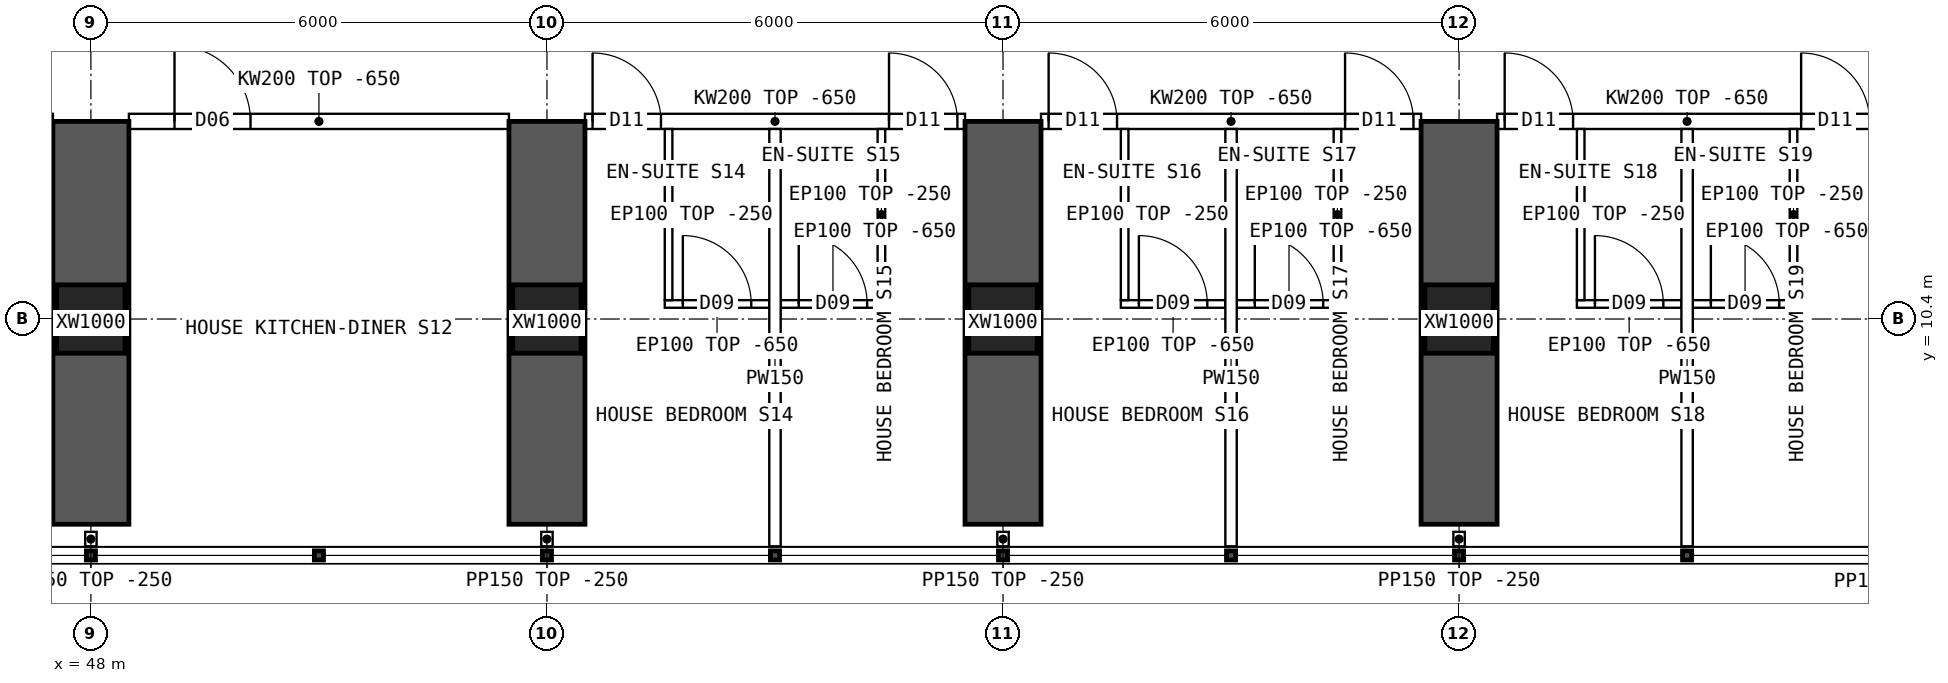
"""IFC4 building model, lengths in metres.
Left out: names, types, materials, properties, quantities, classifications, styles, units other than length and angle.
Written with IfcOpenShell. Run it as: python <this file> out.ifc"""

import sys

from ifc_helpers import new_model, si_unit, direction, frame, frame_2d, origin, origin_2d, place, context, subcontext, project, spatial, polyline, rectangle, hollow_rectangle, outline, extrude, element, fill, save


model = new_model("IFC4")
c1 = context("Model", 3, precision=1e-05, world=origin(), true_north=direction((0.0, 1.0)))
c2 = subcontext(c1, "Body", "Model", "MODEL_VIEW")
j1 = project(units=[si_unit("LENGTHUNIT", "METRE"), si_unit("PLANEANGLEUNIT", "RADIAN")], contexts=[c1])
p1 = place(None, origin())
s1 = spatial("IfcSite", under=j1, at=p1, CompositionType="ELEMENT")
p2 = place(p1, origin())
s2 = spatial("IfcBuilding", under=s1, at=p2, CompositionType="ELEMENT")
p3 = place(p2, frame((0.0, 0.0, 31.45)))
s3 = spatial("IfcBuildingStorey", under=s2, at=p3, CompositionType="ELEMENT", Elevation=31.45)
for number, where, z_axis, x_axis in (
    (1, (48.0, 10.4, 0.0), (0.0, 0.0, 1.0), (1.0, 0.0, 0.0)),
    (2, (54.0, 10.4, 0.0), (0.0, 0.0, 1.0), (1.0, 0.0, 0.0)),
    (3, (60.0, 10.4, 0.0), (0.0, 0.0, 1.0), (1.0, 0.0, 0.0)),
    (4, (66.0, 10.4, 0.0), (0.0, 0.0, 1.0), (1.0, 0.0, 0.0)),
):
    element("IfcColumn", number, at=place(p3, frame(where, z_axis=z_axis, x_axis=x_axis)), inside=s3, PredefinedType="COLUMN", context=c2, shape_type="SweptSolid", body=[
        extrude(hollow_rectangle(XDim=0.9, YDim=0.9, WallThickness=0.09, at=origin_2d()), origin(), (0.0, 0.0, 1.0), 3.75),
    ])
for number, where, z_axis, x_axis in (
    (5, (48.0, 7.7, 0.0), (0.0, 0.0, 1.0), (0.0, 1.0, 0.0)),
    (6, (54.0, 7.7, 0.0), (0.0, 0.0, 1.0), (0.0, 1.0, 0.0)),
    (7, (60.0, 7.7, 0.0), (0.0, 0.0, 1.0), (0.0, 1.0, 0.0)),
    (8, (66.0, 7.7, 0.0), (0.0, 0.0, 1.0), (0.0, 1.0, 0.0)),
):
    element("IfcWall", number, at=place(p3, frame(where, z_axis=z_axis, x_axis=x_axis)), inside=s3, PredefinedType="SHEAR", context=c2, shape_type="SweptSolid", body=[
        extrude(rectangle(XDim=5.3, YDim=1.0, at=frame_2d((2.65, 0.0))), origin(), (0.0, 0.0, 1.0), 3.75),
    ])
p4 = place(p3, frame((48.5, 13.0, 0.0), z_axis=(0.0, 0.0, 1.0), x_axis=(1.0, 0.0, 0.0)))
e9 = element("IfcWall", 9, at=p4, inside=s3, PredefinedType="SOLIDWALL", context=c2, shape_type="SweptSolid", body=[
    extrude(outline(polyline([(0.0, 0.0), (5.0, 0.0), (5.0, 3.1), (0.0, 3.1), (0.0, 0.0)])), frame((0.0, 0.1, 0.0), z_axis=(0.0, -1.0, 0.0), x_axis=(1.0, 0.0, 0.0)), (0.0, 0.0, 1.0), 0.2),
])
p5 = place(p4, frame((0.6, 0.0, 0.0)))
e10 = element("IfcOpeningElement", 10, at=p5, cuts=e9, PredefinedType="OPENING", context=c2, shape_type="SweptSolid", body=[
    extrude(rectangle(XDim=1.0, YDim=2.1, at=frame_2d((0.5, 1.05))), frame((0.0, 0.11, 0.0), z_axis=(0.0, -1.0, 0.0), x_axis=(1.0, 0.0, 0.0)), (0.0, 0.0, 1.0), 0.22),
])
p6 = place(p3, frame((54.5, 13.0, 0.0), z_axis=(0.0, 0.0, 1.0), x_axis=(1.0, 0.0, 0.0)))
e11 = element("IfcWall", 11, at=p6, inside=s3, PredefinedType="SOLIDWALL", context=c2, shape_type="SweptSolid", body=[
    extrude(outline(polyline([(0.0, 0.0), (5.0, 0.0), (5.0, 3.1), (0.0, 3.1), (0.0, 0.0)])), frame((0.0, 0.1, 0.0), z_axis=(0.0, -1.0, 0.0), x_axis=(1.0, 0.0, 0.0)), (0.0, 0.0, 1.0), 0.2),
])
p7 = place(p6, frame((0.1, 0.0, 0.0)))
e12 = element("IfcOpeningElement", 12, at=p7, cuts=e11, PredefinedType="OPENING", context=c2, shape_type="SweptSolid", body=[
    extrude(rectangle(XDim=0.9, YDim=2.1, at=frame_2d((0.45, 1.05))), frame((0.0, 0.11, 0.0), z_axis=(0.0, -1.0, 0.0), x_axis=(1.0, 0.0, 0.0)), (0.0, 0.0, 1.0), 0.22),
])
p8 = place(p6, frame((4.0, 0.0, 0.0)))
e13 = element("IfcOpeningElement", 13, at=p8, cuts=e11, PredefinedType="OPENING", context=c2, shape_type="SweptSolid", body=[
    extrude(rectangle(XDim=0.9, YDim=2.1, at=frame_2d((0.45, 1.05))), frame((0.0, 0.11, 0.0), z_axis=(0.0, -1.0, 0.0), x_axis=(1.0, 0.0, 0.0)), (0.0, 0.0, 1.0), 0.22),
])
p9 = place(p3, frame((60.5, 13.0, 0.0), z_axis=(0.0, 0.0, 1.0), x_axis=(1.0, 0.0, 0.0)))
e14 = element("IfcWall", 14, at=p9, inside=s3, PredefinedType="SOLIDWALL", context=c2, shape_type="SweptSolid", body=[
    extrude(outline(polyline([(0.0, 0.0), (5.0, 0.0), (5.0, 3.1), (0.0, 3.1), (0.0, 0.0)])), frame((0.0, 0.1, 0.0), z_axis=(0.0, -1.0, 0.0), x_axis=(1.0, 0.0, 0.0)), (0.0, 0.0, 1.0), 0.2),
])
p10 = place(p9, frame((0.1, 0.0, 0.0)))
e15 = element("IfcOpeningElement", 15, at=p10, cuts=e14, PredefinedType="OPENING", context=c2, shape_type="SweptSolid", body=[
    extrude(rectangle(XDim=0.9, YDim=2.1, at=frame_2d((0.45, 1.05))), frame((0.0, 0.11, 0.0), z_axis=(0.0, -1.0, 0.0), x_axis=(1.0, 0.0, 0.0)), (0.0, 0.0, 1.0), 0.22),
])
p11 = place(p9, frame((4.0, 0.0, 0.0)))
e16 = element("IfcOpeningElement", 16, at=p11, cuts=e14, PredefinedType="OPENING", context=c2, shape_type="SweptSolid", body=[
    extrude(rectangle(XDim=0.9, YDim=2.1, at=frame_2d((0.45, 1.05))), frame((0.0, 0.11, 0.0), z_axis=(0.0, -1.0, 0.0), x_axis=(1.0, 0.0, 0.0)), (0.0, 0.0, 1.0), 0.22),
])
p12 = place(p3, frame((66.5, 13.0, 0.0), z_axis=(0.0, 0.0, 1.0), x_axis=(1.0, 0.0, 0.0)))
e17 = element("IfcWall", 17, at=p12, inside=s3, PredefinedType="SOLIDWALL", context=c2, shape_type="SweptSolid", body=[
    extrude(outline(polyline([(0.0, 0.0), (5.0, 0.0), (5.0, 3.1), (0.0, 3.1), (0.0, 0.0)])), frame((0.0, 0.1, 0.0), z_axis=(0.0, -1.0, 0.0), x_axis=(1.0, 0.0, 0.0)), (0.0, 0.0, 1.0), 0.2),
])
p13 = place(p12, frame((0.1, 0.0, 0.0)))
e18 = element("IfcOpeningElement", 18, at=p13, cuts=e17, PredefinedType="OPENING", context=c2, shape_type="SweptSolid", body=[
    extrude(rectangle(XDim=0.9, YDim=2.1, at=frame_2d((0.45, 1.05))), frame((0.0, 0.11, 0.0), z_axis=(0.0, -1.0, 0.0), x_axis=(1.0, 0.0, 0.0)), (0.0, 0.0, 1.0), 0.22),
])
p14 = place(p12, frame((4.0, 0.0, 0.0)))
e19 = element("IfcOpeningElement", 19, at=p14, cuts=e17, PredefinedType="OPENING", context=c2, shape_type="SweptSolid", body=[
    extrude(rectangle(XDim=0.9, YDim=2.1, at=frame_2d((0.45, 1.05))), frame((0.0, 0.11, 0.0), z_axis=(0.0, -1.0, 0.0), x_axis=(1.0, 0.0, 0.0)), (0.0, 0.0, 1.0), 0.22),
])
p15 = place(p3, frame((57.0, 7.41, 0.0), z_axis=(0.0, 0.0, 1.0), x_axis=(0.0, 1.0, 0.0)))
e20 = element("IfcWall", 20, at=p15, inside=s3, PredefinedType="PARTITIONING", context=c2, shape_type="SweptSolid", body=[
    extrude(outline(polyline([(0.0, 0.0), (5.49, 0.0), (5.49, 3.1), (5.442, 3.1), (5.44, 3.5), (3.192, 3.5), (3.19, 3.1), (2.792, 3.1), (2.79, 3.5), (0.0, 3.5), (0.0, 0.0)])), frame((0.0, 0.075, 0.0), z_axis=(0.0, -1.0, 0.0), x_axis=(1.0, 0.0, 0.0)), (0.0, 0.0, 1.0), 0.15),
])
p16 = place(p3, frame((56.925, 10.598, 0.0), z_axis=(0.0, 0.0, 1.0), x_axis=(-1.0, 0.0, 0.0)))
e21 = element("IfcWall", 21, at=p16, inside=s3, PredefinedType="PARTITIONING", context=c2, shape_type="SweptSolid", body=[
    extrude(outline(polyline([(0.0, 0.0), (1.375, 0.0), (1.375, 3.1), (0.0, 3.1), (0.0, 0.0)])), frame((0.0, 0.05, 0.0), z_axis=(0.0, -1.0, 0.0), x_axis=(1.0, 0.0, 0.0)), (0.0, 0.0, 1.0), 0.1),
])
p17 = place(p16, frame((0.238, 0.0, 0.0)))
e22 = element("IfcOpeningElement", 22, at=p17, cuts=e21, PredefinedType="OPENING", context=c2, shape_type="SweptSolid", body=[
    extrude(rectangle(XDim=0.9, YDim=2.1, at=frame_2d((0.45, 1.05))), frame((0.0, 0.06, 0.0), z_axis=(0.0, -1.0, 0.0), x_axis=(1.0, 0.0, 0.0)), (0.0, 0.0, 1.0), 0.12),
])
p18 = place(p3, frame((55.6, 10.648, 0.0), z_axis=(0.0, 0.0, 1.0), x_axis=(0.0, 1.0, 0.0)))
e23 = element("IfcWall", 23, at=p18, inside=s3, PredefinedType="PARTITIONING", context=c2, shape_type="SweptSolid", body=[
    extrude(outline(polyline([(0.0, 0.0), (2.252, 0.0), (2.252, 3.1), (2.204, 3.1), (2.202, 3.5), (0.0, 3.5), (0.0, 0.0)])), frame((0.0, 0.05, 0.0), z_axis=(0.0, -1.0, 0.0), x_axis=(1.0, 0.0, 0.0)), (0.0, 0.0, 1.0), 0.1),
])
p19 = place(p3, frame((58.45, 10.598, 0.0), z_axis=(0.0, 0.0, 1.0), x_axis=(-1.0, 0.0, 0.0)))
e24 = element("IfcWall", 24, at=p19, inside=s3, PredefinedType="PARTITIONING", context=c2, shape_type="SweptSolid", body=[
    extrude(outline(polyline([(0.0, 0.0), (1.375, 0.0), (1.375, 3.1), (0.0, 3.1), (0.0, 0.0)])), frame((0.0, 0.05, 0.0), z_axis=(0.0, -1.0, 0.0), x_axis=(1.0, 0.0, 0.0)), (0.0, 0.0, 1.0), 0.1),
])
p20 = place(p19, frame((0.238, 0.0, 0.0)))
e25 = element("IfcOpeningElement", 25, at=p20, cuts=e24, PredefinedType="OPENING", context=c2, shape_type="SweptSolid", body=[
    extrude(rectangle(XDim=0.9, YDim=2.1, at=frame_2d((0.45, 1.05))), frame((0.0, 0.06, 0.0), z_axis=(0.0, -1.0, 0.0), x_axis=(1.0, 0.0, 0.0)), (0.0, 0.0, 1.0), 0.12),
])
p21 = place(p3, frame((58.4, 10.648, 0.0), z_axis=(0.0, 0.0, 1.0), x_axis=(0.0, 1.0, 0.0)))
e26 = element("IfcWall", 26, at=p21, inside=s3, PredefinedType="PARTITIONING", context=c2, shape_type="SweptSolid", body=[
    extrude(outline(polyline([(0.0, 0.0), (2.252, 0.0), (2.252, 3.1), (2.204, 3.1), (2.202, 3.5), (0.0, 3.5), (0.0, 0.0)])), frame((0.0, 0.05, 0.0), z_axis=(0.0, -1.0, 0.0), x_axis=(1.0, 0.0, 0.0)), (0.0, 0.0, 1.0), 0.1),
])
p22 = place(p3, frame((63.0, 7.41, 0.0), z_axis=(0.0, 0.0, 1.0), x_axis=(0.0, 1.0, 0.0)))
e27 = element("IfcWall", 27, at=p22, inside=s3, PredefinedType="PARTITIONING", context=c2, shape_type="SweptSolid", body=[
    extrude(outline(polyline([(0.0, 0.0), (5.49, 0.0), (5.49, 3.1), (5.442, 3.1), (5.44, 3.5), (3.192, 3.5), (3.19, 3.1), (2.792, 3.1), (2.79, 3.5), (0.0, 3.5), (0.0, 0.0)])), frame((0.0, 0.075, 0.0), z_axis=(0.0, -1.0, 0.0), x_axis=(1.0, 0.0, 0.0)), (0.0, 0.0, 1.0), 0.15),
])
p23 = place(p3, frame((62.925, 10.598, 0.0), z_axis=(0.0, 0.0, 1.0), x_axis=(-1.0, 0.0, 0.0)))
e28 = element("IfcWall", 28, at=p23, inside=s3, PredefinedType="PARTITIONING", context=c2, shape_type="SweptSolid", body=[
    extrude(outline(polyline([(0.0, 0.0), (1.375, 0.0), (1.375, 3.1), (0.0, 3.1), (0.0, 0.0)])), frame((0.0, 0.05, 0.0), z_axis=(0.0, -1.0, 0.0), x_axis=(1.0, 0.0, 0.0)), (0.0, 0.0, 1.0), 0.1),
])
p24 = place(p23, frame((0.238, 0.0, 0.0)))
e29 = element("IfcOpeningElement", 29, at=p24, cuts=e28, PredefinedType="OPENING", context=c2, shape_type="SweptSolid", body=[
    extrude(rectangle(XDim=0.9, YDim=2.1, at=frame_2d((0.45, 1.05))), frame((0.0, 0.06, 0.0), z_axis=(0.0, -1.0, 0.0), x_axis=(1.0, 0.0, 0.0)), (0.0, 0.0, 1.0), 0.12),
])
p25 = place(p3, frame((61.6, 10.648, 0.0), z_axis=(0.0, 0.0, 1.0), x_axis=(0.0, 1.0, 0.0)))
e30 = element("IfcWall", 30, at=p25, inside=s3, PredefinedType="PARTITIONING", context=c2, shape_type="SweptSolid", body=[
    extrude(outline(polyline([(0.0, 0.0), (2.252, 0.0), (2.252, 3.1), (2.204, 3.1), (2.202, 3.5), (0.0, 3.5), (0.0, 0.0)])), frame((0.0, 0.05, 0.0), z_axis=(0.0, -1.0, 0.0), x_axis=(1.0, 0.0, 0.0)), (0.0, 0.0, 1.0), 0.1),
])
p26 = place(p3, frame((64.45, 10.598, 0.0), z_axis=(0.0, 0.0, 1.0), x_axis=(-1.0, 0.0, 0.0)))
e31 = element("IfcWall", 31, at=p26, inside=s3, PredefinedType="PARTITIONING", context=c2, shape_type="SweptSolid", body=[
    extrude(outline(polyline([(0.0, 0.0), (1.375, 0.0), (1.375, 3.1), (0.0, 3.1), (0.0, 0.0)])), frame((0.0, 0.05, 0.0), z_axis=(0.0, -1.0, 0.0), x_axis=(1.0, 0.0, 0.0)), (0.0, 0.0, 1.0), 0.1),
])
p27 = place(p26, frame((0.238, 0.0, 0.0)))
e32 = element("IfcOpeningElement", 32, at=p27, cuts=e31, PredefinedType="OPENING", context=c2, shape_type="SweptSolid", body=[
    extrude(rectangle(XDim=0.9, YDim=2.1, at=frame_2d((0.45, 1.05))), frame((0.0, 0.06, 0.0), z_axis=(0.0, -1.0, 0.0), x_axis=(1.0, 0.0, 0.0)), (0.0, 0.0, 1.0), 0.12),
])
p28 = place(p3, frame((64.4, 10.648, 0.0), z_axis=(0.0, 0.0, 1.0), x_axis=(0.0, 1.0, 0.0)))
e33 = element("IfcWall", 33, at=p28, inside=s3, PredefinedType="PARTITIONING", context=c2, shape_type="SweptSolid", body=[
    extrude(outline(polyline([(0.0, 0.0), (2.252, 0.0), (2.252, 3.1), (2.204, 3.1), (2.202, 3.5), (0.0, 3.5), (0.0, 0.0)])), frame((0.0, 0.05, 0.0), z_axis=(0.0, -1.0, 0.0), x_axis=(1.0, 0.0, 0.0)), (0.0, 0.0, 1.0), 0.1),
])
p29 = place(p3, frame((69.0, 7.41, 0.0), z_axis=(0.0, 0.0, 1.0), x_axis=(0.0, 1.0, 0.0)))
e34 = element("IfcWall", 34, at=p29, inside=s3, PredefinedType="PARTITIONING", context=c2, shape_type="SweptSolid", body=[
    extrude(outline(polyline([(0.0, 0.0), (5.49, 0.0), (5.49, 3.1), (5.442, 3.1), (5.44, 3.5), (3.192, 3.5), (3.19, 3.1), (2.792, 3.1), (2.79, 3.5), (0.0, 3.5), (0.0, 0.0)])), frame((0.0, 0.075, 0.0), z_axis=(0.0, -1.0, 0.0), x_axis=(1.0, 0.0, 0.0)), (0.0, 0.0, 1.0), 0.15),
])
p30 = place(p3, frame((68.925, 10.598, 0.0), z_axis=(0.0, 0.0, 1.0), x_axis=(-1.0, 0.0, 0.0)))
e35 = element("IfcWall", 35, at=p30, inside=s3, PredefinedType="PARTITIONING", context=c2, shape_type="SweptSolid", body=[
    extrude(outline(polyline([(0.0, 0.0), (1.375, 0.0), (1.375, 3.1), (0.0, 3.1), (0.0, 0.0)])), frame((0.0, 0.05, 0.0), z_axis=(0.0, -1.0, 0.0), x_axis=(1.0, 0.0, 0.0)), (0.0, 0.0, 1.0), 0.1),
])
p31 = place(p30, frame((0.238, 0.0, 0.0)))
e36 = element("IfcOpeningElement", 36, at=p31, cuts=e35, PredefinedType="OPENING", context=c2, shape_type="SweptSolid", body=[
    extrude(rectangle(XDim=0.9, YDim=2.1, at=frame_2d((0.45, 1.05))), frame((0.0, 0.06, 0.0), z_axis=(0.0, -1.0, 0.0), x_axis=(1.0, 0.0, 0.0)), (0.0, 0.0, 1.0), 0.12),
])
p32 = place(p3, frame((67.6, 10.648, 0.0), z_axis=(0.0, 0.0, 1.0), x_axis=(0.0, 1.0, 0.0)))
e37 = element("IfcWall", 37, at=p32, inside=s3, PredefinedType="PARTITIONING", context=c2, shape_type="SweptSolid", body=[
    extrude(outline(polyline([(0.0, 0.0), (2.252, 0.0), (2.252, 3.1), (2.204, 3.1), (2.202, 3.5), (0.0, 3.5), (0.0, 0.0)])), frame((0.0, 0.05, 0.0), z_axis=(0.0, -1.0, 0.0), x_axis=(1.0, 0.0, 0.0)), (0.0, 0.0, 1.0), 0.1),
])
p33 = place(p3, frame((70.45, 10.598, 0.0), z_axis=(0.0, 0.0, 1.0), x_axis=(-1.0, 0.0, 0.0)))
e38 = element("IfcWall", 38, at=p33, inside=s3, PredefinedType="PARTITIONING", context=c2, shape_type="SweptSolid", body=[
    extrude(outline(polyline([(0.0, 0.0), (1.375, 0.0), (1.375, 3.1), (0.0, 3.1), (0.0, 0.0)])), frame((0.0, 0.05, 0.0), z_axis=(0.0, -1.0, 0.0), x_axis=(1.0, 0.0, 0.0)), (0.0, 0.0, 1.0), 0.1),
])
p34 = place(p33, frame((0.238, 0.0, 0.0)))
e39 = element("IfcOpeningElement", 39, at=p34, cuts=e38, PredefinedType="OPENING", context=c2, shape_type="SweptSolid", body=[
    extrude(rectangle(XDim=0.9, YDim=2.1, at=frame_2d((0.45, 1.05))), frame((0.0, 0.06, 0.0), z_axis=(0.0, -1.0, 0.0), x_axis=(1.0, 0.0, 0.0)), (0.0, 0.0, 1.0), 0.12),
])
p35 = place(p3, frame((70.4, 10.648, 0.0), z_axis=(0.0, 0.0, 1.0), x_axis=(0.0, 1.0, 0.0)))
e40 = element("IfcWall", 40, at=p35, inside=s3, PredefinedType="PARTITIONING", context=c2, shape_type="SweptSolid", body=[
    extrude(outline(polyline([(0.0, 0.0), (2.252, 0.0), (2.252, 3.1), (2.204, 3.1), (2.202, 3.5), (0.0, 3.5), (0.0, 0.0)])), frame((0.0, 0.05, 0.0), z_axis=(0.0, -1.0, 0.0), x_axis=(1.0, 0.0, 0.0)), (0.0, 0.0, 1.0), 0.1),
])
for number, where, z_axis, x_axis in (
    (41, (48.0, 7.6, 0.0), (0.0, 0.0, 1.0), (0.0, -1.0, 0.0)),
    (42, (54.0, 7.6, 0.0), (0.0, 0.0, 1.0), (0.0, -1.0, 0.0)),
    (43, (60.0, 7.6, 0.0), (0.0, 0.0, 1.0), (0.0, -1.0, 0.0)),
    (44, (66.0, 7.6, 0.0), (0.0, 0.0, 1.0), (0.0, -1.0, 0.0)),
):
    element("IfcWall", number, at=place(p3, frame(where, z_axis=z_axis, x_axis=x_axis)), inside=s3, PredefinedType="PARTITIONING", context=c2, shape_type="SweptSolid", body=[
        extrude(rectangle(XDim=0.19, YDim=0.15, at=frame_2d((0.095, 0.0))), origin(), (0.0, 0.0, 1.0), 3.5),
    ])
p36 = place(p5, origin())
e45 = element("IfcDoor", 45, at=p36, inside=s3, OperationType="SINGLE_SWING_LEFT", PredefinedType="DOOR", context=c2, shape_type="SweptSolid", body=[
    extrude(rectangle(XDim=1.0, YDim=2.1, at=frame_2d((0.5, 1.05))), frame((0.0, 0.025, 0.0), z_axis=(0.0, -1.0, 0.0), x_axis=(1.0, 0.0, 0.0)), (0.0, 0.0, 1.0), 0.05),
])
fill(e10, e45)
p37 = place(p17, origin())
e46 = element("IfcDoor", 46, at=p37, inside=s3, OperationType="SINGLE_SWING_RIGHT", PredefinedType="DOOR", context=c2, shape_type="SweptSolid", body=[
    extrude(rectangle(XDim=0.9, YDim=2.1, at=frame_2d((0.45, 1.05))), frame((0.0, 0.025, 0.0), z_axis=(0.0, -1.0, 0.0), x_axis=(1.0, 0.0, 0.0)), (0.0, 0.0, 1.0), 0.05),
])
fill(e22, e46)
p38 = place(p7, origin())
e47 = element("IfcDoor", 47, at=p38, inside=s3, OperationType="SINGLE_SWING_LEFT", PredefinedType="DOOR", context=c2, shape_type="SweptSolid", body=[
    extrude(rectangle(XDim=0.9, YDim=2.1, at=frame_2d((0.45, 1.05))), frame((0.0, 0.025, 0.0), z_axis=(0.0, -1.0, 0.0), x_axis=(1.0, 0.0, 0.0)), (0.0, 0.0, 1.0), 0.05),
])
fill(e12, e47)
p39 = place(p20, origin())
e48 = element("IfcDoor", 48, at=p39, inside=s3, OperationType="SINGLE_SWING_RIGHT", PredefinedType="DOOR", context=c2, shape_type="SweptSolid", body=[
    extrude(rectangle(XDim=0.9, YDim=2.1, at=frame_2d((0.45, 1.05))), frame((0.0, 0.025, 0.0), z_axis=(0.0, -1.0, 0.0), x_axis=(1.0, 0.0, 0.0)), (0.0, 0.0, 1.0), 0.05),
])
fill(e25, e48)
p40 = place(p8, origin())
e49 = element("IfcDoor", 49, at=p40, inside=s3, OperationType="SINGLE_SWING_LEFT", PredefinedType="DOOR", context=c2, shape_type="SweptSolid", body=[
    extrude(rectangle(XDim=0.9, YDim=2.1, at=frame_2d((0.45, 1.05))), frame((0.0, 0.025, 0.0), z_axis=(0.0, -1.0, 0.0), x_axis=(1.0, 0.0, 0.0)), (0.0, 0.0, 1.0), 0.05),
])
fill(e13, e49)
p41 = place(p24, origin())
e50 = element("IfcDoor", 50, at=p41, inside=s3, OperationType="SINGLE_SWING_RIGHT", PredefinedType="DOOR", context=c2, shape_type="SweptSolid", body=[
    extrude(rectangle(XDim=0.9, YDim=2.1, at=frame_2d((0.45, 1.05))), frame((0.0, 0.025, 0.0), z_axis=(0.0, -1.0, 0.0), x_axis=(1.0, 0.0, 0.0)), (0.0, 0.0, 1.0), 0.05),
])
fill(e29, e50)
p42 = place(p10, origin())
e51 = element("IfcDoor", 51, at=p42, inside=s3, OperationType="SINGLE_SWING_LEFT", PredefinedType="DOOR", context=c2, shape_type="SweptSolid", body=[
    extrude(rectangle(XDim=0.9, YDim=2.1, at=frame_2d((0.45, 1.05))), frame((0.0, 0.025, 0.0), z_axis=(0.0, -1.0, 0.0), x_axis=(1.0, 0.0, 0.0)), (0.0, 0.0, 1.0), 0.05),
])
fill(e15, e51)
p43 = place(p27, origin())
e52 = element("IfcDoor", 52, at=p43, inside=s3, OperationType="SINGLE_SWING_RIGHT", PredefinedType="DOOR", context=c2, shape_type="SweptSolid", body=[
    extrude(rectangle(XDim=0.9, YDim=2.1, at=frame_2d((0.45, 1.05))), frame((0.0, 0.025, 0.0), z_axis=(0.0, -1.0, 0.0), x_axis=(1.0, 0.0, 0.0)), (0.0, 0.0, 1.0), 0.05),
])
fill(e32, e52)
p44 = place(p11, origin())
e53 = element("IfcDoor", 53, at=p44, inside=s3, OperationType="SINGLE_SWING_LEFT", PredefinedType="DOOR", context=c2, shape_type="SweptSolid", body=[
    extrude(rectangle(XDim=0.9, YDim=2.1, at=frame_2d((0.45, 1.05))), frame((0.0, 0.025, 0.0), z_axis=(0.0, -1.0, 0.0), x_axis=(1.0, 0.0, 0.0)), (0.0, 0.0, 1.0), 0.05),
])
fill(e16, e53)
p45 = place(p31, origin())
e54 = element("IfcDoor", 54, at=p45, inside=s3, OperationType="SINGLE_SWING_RIGHT", PredefinedType="DOOR", context=c2, shape_type="SweptSolid", body=[
    extrude(rectangle(XDim=0.9, YDim=2.1, at=frame_2d((0.45, 1.05))), frame((0.0, 0.025, 0.0), z_axis=(0.0, -1.0, 0.0), x_axis=(1.0, 0.0, 0.0)), (0.0, 0.0, 1.0), 0.05),
])
fill(e36, e54)
p46 = place(p13, origin())
e55 = element("IfcDoor", 55, at=p46, inside=s3, OperationType="SINGLE_SWING_LEFT", PredefinedType="DOOR", context=c2, shape_type="SweptSolid", body=[
    extrude(rectangle(XDim=0.9, YDim=2.1, at=frame_2d((0.45, 1.05))), frame((0.0, 0.025, 0.0), z_axis=(0.0, -1.0, 0.0), x_axis=(1.0, 0.0, 0.0)), (0.0, 0.0, 1.0), 0.05),
])
fill(e18, e55)
p47 = place(p34, origin())
e56 = element("IfcDoor", 56, at=p47, inside=s3, OperationType="SINGLE_SWING_RIGHT", PredefinedType="DOOR", context=c2, shape_type="SweptSolid", body=[
    extrude(rectangle(XDim=0.9, YDim=2.1, at=frame_2d((0.45, 1.05))), frame((0.0, 0.025, 0.0), z_axis=(0.0, -1.0, 0.0), x_axis=(1.0, 0.0, 0.0)), (0.0, 0.0, 1.0), 0.05),
])
fill(e39, e56)
p48 = place(p14, origin())
e57 = element("IfcDoor", 57, at=p48, inside=s3, OperationType="SINGLE_SWING_LEFT", PredefinedType="DOOR", context=c2, shape_type="SweptSolid", body=[
    extrude(rectangle(XDim=0.9, YDim=2.1, at=frame_2d((0.45, 1.05))), frame((0.0, 0.025, 0.0), z_axis=(0.0, -1.0, 0.0), x_axis=(1.0, 0.0, 0.0)), (0.0, 0.0, 1.0), 0.05),
])
fill(e19, e57)
save(model, sys.argv[1])
